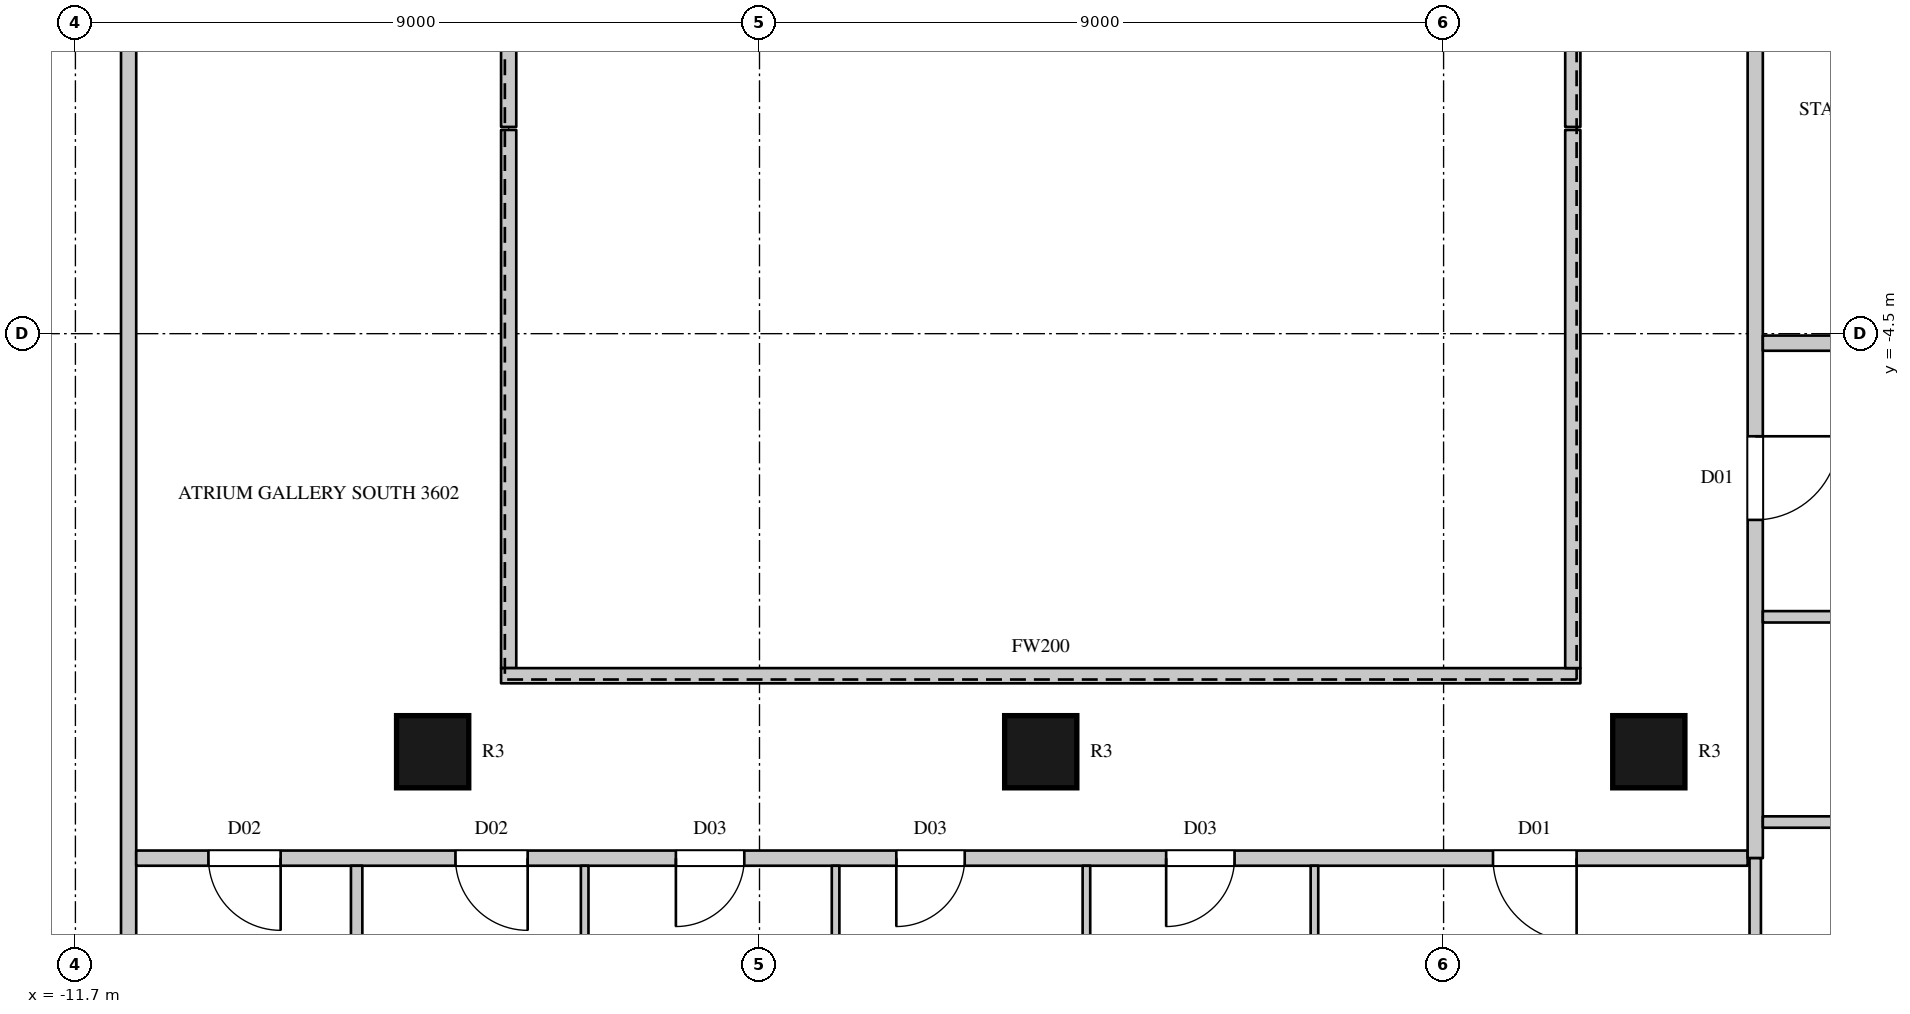
"""IFC4 building model, lengths in metres.
Left out: names, types, materials, properties, quantities, classifications, styles, units other than length and angle.
Written with IfcOpenShell. Run it as: python <this file> out.ifc"""

import sys

from ifc_helpers import new_model, si_unit, direction, frame, frame_2d, origin, origin_2d, place, context, subcontext, project, spatial, rectangle, circle, extrude, element, fill, save


model = new_model("IFC4")
c1 = context("Model", 3, precision=1e-05, world=origin(), true_north=direction((0.0, 1.0)))
c2 = subcontext(c1, "Body", "Model", "MODEL_VIEW")
j1 = project(units=[si_unit("LENGTHUNIT", "METRE"), si_unit("PLANEANGLEUNIT", "RADIAN")], contexts=[c1])
p1 = place(None, origin())
s1 = spatial("IfcSite", under=j1, at=p1, CompositionType="ELEMENT")
p2 = place(p1, origin())
s2 = spatial("IfcBuilding", under=s1, at=p2, CompositionType="ELEMENT")
p3 = place(p2, frame((0.0, 0.0, 168.7)))
s3 = spatial("IfcBuildingStorey", under=s2, at=p3, CompositionType="ELEMENT", Elevation=168.7)
for number, where, z_axis, x_axis in (
    (1, (-7.0, -10.0, 0.0), (0.0, 0.0, 1.0), (1.0, 0.0, 0.0)),
    (2, (1.0, -10.0, 0.0), (0.0, 0.0, 1.0), (1.0, 0.0, 0.0)),
    (3, (9.0, -10.0, 0.0), (0.0, 0.0, 1.0), (1.0, 0.0, 0.0)),
):
    element("IfcColumn", number, at=place(p3, frame(where, z_axis=z_axis, x_axis=x_axis)), inside=s3, PredefinedType="COLUMN", context=c2, shape_type="SweptSolid", body=[
        extrude(circle(Radius=0.475, at=origin_2d()), origin(), (0.0, 0.0, 1.0), 4.1),
    ])
p4 = place(p3, frame((-11.0, -14.8, 0.0), z_axis=(0.0, 0.0, 1.0), x_axis=(0.0, 1.0, 0.0)))
e4 = element("IfcWall", 4, at=p4, inside=s3, PredefinedType="PARTITIONING", context=c2, shape_type="SweptSolid", body=[
    extrude(rectangle(XDim=29.6, YDim=0.2, at=frame_2d((14.8, 0.0))), origin(), (0.0, 0.0, 1.0), 3.8),
])
p5 = place(p4, frame((19.25, 0.0, 0.0)))
e5 = element("IfcOpeningElement", 5, at=p5, cuts=e4, PredefinedType="OPENING", context=c2, shape_type="SweptSolid", body=[
    extrude(rectangle(XDim=1.5, YDim=2.4, at=frame_2d((0.75, 1.2))), frame((0.0, 0.11, 0.0), z_axis=(0.0, -1.0, 0.0), x_axis=(1.0, 0.0, 0.0)), (0.0, 0.0, 1.0), 0.22),
])
p6 = place(p3, frame((-10.9, -11.4, 0.0), z_axis=(0.0, 0.0, 1.0), x_axis=(1.0, 0.0, 0.0)))
e6 = element("IfcWall", 6, at=p6, inside=s3, PredefinedType="PARTITIONING", context=c2, shape_type="SweptSolid", body=[
    extrude(rectangle(XDim=21.2, YDim=0.2, at=frame_2d((10.6, 0.0))), origin(), (0.0, 0.0, 1.0), 3.8),
])
p7 = place(p6, frame((0.95, 0.0, 0.0)))
e7 = element("IfcOpeningElement", 7, at=p7, cuts=e6, PredefinedType="OPENING", context=c2, shape_type="SweptSolid", body=[
    extrude(rectangle(XDim=0.95, YDim=2.2, at=frame_2d((0.475, 1.1))), frame((0.0, 0.11, 0.0), z_axis=(0.0, -1.0, 0.0), x_axis=(1.0, 0.0, 0.0)), (0.0, 0.0, 1.0), 0.22),
])
p8 = place(p6, frame((4.2, 0.0, 0.0)))
e8 = element("IfcOpeningElement", 8, at=p8, cuts=e6, PredefinedType="OPENING", context=c2, shape_type="SweptSolid", body=[
    extrude(rectangle(XDim=0.95, YDim=2.2, at=frame_2d((0.475, 1.1))), frame((0.0, 0.11, 0.0), z_axis=(0.0, -1.0, 0.0), x_axis=(1.0, 0.0, 0.0)), (0.0, 0.0, 1.0), 0.22),
])
p9 = place(p6, frame((7.1, 0.0, 0.0)))
e9 = element("IfcOpeningElement", 9, at=p9, cuts=e6, PredefinedType="OPENING", context=c2, shape_type="SweptSolid", body=[
    extrude(rectangle(XDim=0.9, YDim=2.2, at=frame_2d((0.45, 1.1))), frame((0.0, 0.11, 0.0), z_axis=(0.0, -1.0, 0.0), x_axis=(1.0, 0.0, 0.0)), (0.0, 0.0, 1.0), 0.22),
])
p10 = place(p6, frame((10.0, 0.0, 0.0)))
e10 = element("IfcOpeningElement", 10, at=p10, cuts=e6, PredefinedType="OPENING", context=c2, shape_type="SweptSolid", body=[
    extrude(rectangle(XDim=0.9, YDim=2.2, at=frame_2d((0.45, 1.1))), frame((0.0, 0.11, 0.0), z_axis=(0.0, -1.0, 0.0), x_axis=(1.0, 0.0, 0.0)), (0.0, 0.0, 1.0), 0.22),
])
p11 = place(p6, frame((13.55, 0.0, 0.0)))
e11 = element("IfcOpeningElement", 11, at=p11, cuts=e6, PredefinedType="OPENING", context=c2, shape_type="SweptSolid", body=[
    extrude(rectangle(XDim=0.9, YDim=2.2, at=frame_2d((0.45, 1.1))), frame((0.0, 0.11, 0.0), z_axis=(0.0, -1.0, 0.0), x_axis=(1.0, 0.0, 0.0)), (0.0, 0.0, 1.0), 0.22),
])
p12 = place(p6, frame((17.85, 0.0, 0.0)))
e12 = element("IfcOpeningElement", 12, at=p12, cuts=e6, PredefinedType="OPENING", context=c2, shape_type="SweptSolid", body=[
    extrude(rectangle(XDim=1.1, YDim=2.4, at=frame_2d((0.55, 1.2))), frame((0.0, 0.11, 0.0), z_axis=(0.0, -1.0, 0.0), x_axis=(1.0, 0.0, 0.0)), (0.0, 0.0, 1.0), 0.22),
])
p13 = place(p3, frame((-6.0, -8.9, 0.0), z_axis=(0.0, 0.0, 1.0), x_axis=(0.0, 1.0, 0.0)))
e13 = element("IfcWall", 13, at=p13, inside=s3, PredefinedType="PARTITIONING", context=c2, shape_type="SweptSolid", body=[
    extrude(rectangle(XDim=7.08, YDim=0.2, at=frame_2d((3.54, 0.0))), origin(), (0.0, 0.0, 1.0), 3.8),
])
p14 = place(p3, frame((-6.1, -9.0, 0.0), z_axis=(0.0, 0.0, 1.0), x_axis=(1.0, 0.0, 0.0)))
e14 = element("IfcWall", 14, at=p14, inside=s3, PredefinedType="PARTITIONING", context=c2, shape_type="SweptSolid", body=[
    extrude(rectangle(XDim=14.2, YDim=0.2, at=frame_2d((7.1, 0.0))), origin(), (0.0, 0.0, 1.0), 3.8),
])
p15 = place(p3, frame((-6.0, -1.78, 0.0), z_axis=(0.0, 0.0, 1.0), x_axis=(0.0, 1.0, 0.0)))
e15 = element("IfcWall", 15, at=p15, inside=s3, PredefinedType="PARTITIONING", context=c2, shape_type="SweptSolid", body=[
    extrude(rectangle(XDim=10.68, YDim=0.2, at=frame_2d((5.34, 0.0))), origin(), (0.0, 0.0, 1.0), 3.8),
])
p16 = place(p3, frame((8.0, -8.9, 0.0), z_axis=(0.0, 0.0, 1.0), x_axis=(0.0, 1.0, 0.0)))
e16 = element("IfcWall", 16, at=p16, inside=s3, PredefinedType="PARTITIONING", context=c2, shape_type="SweptSolid", body=[
    extrude(rectangle(XDim=7.08, YDim=0.2, at=frame_2d((3.54, 0.0))), origin(), (0.0, 0.0, 1.0), 3.8),
])
p17 = place(p3, frame((8.0, -1.78, 0.0), z_axis=(0.0, 0.0, 1.0), x_axis=(0.0, 1.0, 0.0)))
e17 = element("IfcWall", 17, at=p17, inside=s3, PredefinedType="PARTITIONING", context=c2, shape_type="SweptSolid", body=[
    extrude(rectangle(XDim=10.68, YDim=0.2, at=frame_2d((5.34, 0.0))), origin(), (0.0, 0.0, 1.0), 3.8),
])
p18 = place(p3, frame((10.4, -11.4, 0.0), z_axis=(0.0, 0.0, 1.0), x_axis=(0.0, 1.0, 0.0)))
e18 = element("IfcWall", 18, at=p18, inside=s3, PredefinedType="PARTITIONING", context=c2, shape_type="SweptSolid", body=[
    extrude(rectangle(XDim=23.5, YDim=0.2, at=frame_2d((11.75, 0.0))), origin(), (0.0, 0.0, 1.0), 3.8),
])
p19 = place(p18, frame((12.1, 0.0, 0.0)))
e19 = element("IfcOpeningElement", 19, at=p19, cuts=e18, PredefinedType="OPENING", context=c2, shape_type="SweptSolid", body=[
    extrude(rectangle(XDim=1.5, YDim=2.4, at=frame_2d((0.75, 1.2))), frame((0.0, 0.11, 0.0), z_axis=(0.0, -1.0, 0.0), x_axis=(1.0, 0.0, 0.0)), (0.0, 0.0, 1.0), 0.22),
])
p20 = place(p18, frame((19.25, 0.0, 0.0)))
e20 = element("IfcOpeningElement", 20, at=p20, cuts=e18, PredefinedType="OPENING", context=c2, shape_type="SweptSolid", body=[
    extrude(rectangle(XDim=1.1, YDim=2.4, at=frame_2d((0.55, 1.2))), frame((0.0, 0.11, 0.0), z_axis=(0.0, -1.0, 0.0), x_axis=(1.0, 0.0, 0.0)), (0.0, 0.0, 1.0), 0.22),
])
p21 = place(p18, frame((4.45, 0.0, 0.0)))
e21 = element("IfcOpeningElement", 21, at=p21, cuts=e18, PredefinedType="OPENING", context=c2, shape_type="SweptSolid", body=[
    extrude(rectangle(XDim=1.1, YDim=2.4, at=frame_2d((0.55, 1.2))), frame((0.0, 0.11, 0.0), z_axis=(0.0, -1.0, 0.0), x_axis=(1.0, 0.0, 0.0)), (0.0, 0.0, 1.0), 0.22),
])
p22 = place(p3, frame((10.5, -4.625, 0.0), z_axis=(0.0, 0.0, 1.0), x_axis=(1.0, 0.0, 0.0)))
e22 = element("IfcWall", 22, at=p22, inside=s3, PredefinedType="PARTITIONING", context=c2, shape_type="SweptSolid", body=[
    extrude(rectangle(XDim=4.175, YDim=0.2, at=frame_2d((2.087, 0.0))), origin(), (0.0, 0.0, 1.0), 3.8),
])
p23 = place(p3, frame((-8.0, -16.7, 0.0), z_axis=(0.0, 0.0, 1.0), x_axis=(0.0, 1.0, 0.0)))
e23 = element("IfcWall", 23, at=p23, inside=s3, PredefinedType="PARTITIONING", context=c2, shape_type="SweptSolid", body=[
    extrude(rectangle(XDim=5.2, YDim=0.15, at=frame_2d((2.6, 0.0))), origin(), (0.0, 0.0, 1.0), 3.8),
])
p24 = place(p3, frame((10.4, -16.7, 0.0), z_axis=(0.0, 0.0, 1.0), x_axis=(0.0, 1.0, 0.0)))
e24 = element("IfcWall", 24, at=p24, inside=s3, PredefinedType="PARTITIONING", context=c2, shape_type="SweptSolid", body=[
    extrude(rectangle(XDim=5.3, YDim=0.15, at=frame_2d((2.65, 0.0))), origin(), (0.0, 0.0, 1.0), 3.8),
])
p25 = place(p3, frame((10.5, -10.925, 0.0), z_axis=(0.0, 0.0, 1.0), x_axis=(1.0, 0.0, 0.0)))
e25 = element("IfcWall", 25, at=p25, inside=s3, PredefinedType="PARTITIONING", context=c2, shape_type="SweptSolid", body=[
    extrude(rectangle(XDim=2.606, YDim=0.15, at=frame_2d((1.303, 0.0))), origin(), (0.0, 0.0, 1.0), 3.8),
])
p26 = place(p25, frame((1.2, 0.0, 0.0)))
e26 = element("IfcOpeningElement", 26, at=p26, cuts=e25, PredefinedType="OPENING", context=c2, shape_type="SweptSolid", body=[
    extrude(rectangle(XDim=0.95, YDim=2.2, at=frame_2d((0.475, 1.1))), frame((0.0, 0.085, 0.0), z_axis=(0.0, -1.0, 0.0), x_axis=(1.0, 0.0, 0.0)), (0.0, 0.0, 1.0), 0.17),
])
p27 = place(p3, frame((10.5, -8.225, 0.0), z_axis=(0.0, 0.0, 1.0), x_axis=(1.0, 0.0, 0.0)))
e27 = element("IfcWall", 27, at=p27, inside=s3, PredefinedType="PARTITIONING", context=c2, shape_type="SweptSolid", body=[
    extrude(rectangle(XDim=3.575, YDim=0.15, at=frame_2d((1.788, 0.0))), origin(), (0.0, 0.0, 1.0), 3.15),
])
for number, where, z_axis, x_axis in (
    (28, (-5.0, -16.7, 0.0), (0.0, 0.0, 1.0), (0.0, 1.0, 0.0)),
    (29, (-1.699, -16.7, 0.0), (0.0, 0.0, 1.0), (0.0, 1.0, 0.0)),
):
    element("IfcWall", number, at=place(p3, frame(where, z_axis=z_axis, x_axis=x_axis)), inside=s3, PredefinedType="PARTITIONING", context=c2, shape_type="SweptSolid", body=[
        extrude(rectangle(XDim=5.2, YDim=0.1, at=frame_2d((2.6, 0.0))), origin(), (0.0, 0.0, 1.0), 3.8),
    ])
p28 = place(p3, frame((1.601, -16.7, 0.0), z_axis=(0.0, 0.0, 1.0), x_axis=(0.0, 1.0, 0.0)))
e30 = element("IfcWall", 30, at=p28, inside=s3, PredefinedType="PARTITIONING", context=c2, shape_type="SweptSolid", body=[
    extrude(rectangle(XDim=5.2, YDim=0.1, at=frame_2d((2.6, 0.0))), origin(), (0.0, 0.0, 1.0), 3.15),
])
p29 = place(p3, frame((4.601, -16.7, 0.0), z_axis=(0.0, 0.0, 1.0), x_axis=(0.0, 1.0, 0.0)))
e31 = element("IfcWall", 31, at=p29, inside=s3, PredefinedType="PARTITIONING", context=c2, shape_type="SweptSolid", body=[
    extrude(rectangle(XDim=5.2, YDim=0.1, at=frame_2d((2.6, 0.0))), origin(), (0.0, 0.0, 1.0), 3.8),
])
p30 = place(p7, origin())
e32 = element("IfcDoor", 32, at=p30, inside=s3, OperationType="SINGLE_SWING_LEFT", PredefinedType="DOOR", context=c2, shape_type="SweptSolid", body=[
    extrude(rectangle(XDim=0.95, YDim=2.2, at=frame_2d((0.475, 1.1))), frame((0.0, 0.025, 0.0), z_axis=(0.0, -1.0, 0.0), x_axis=(1.0, 0.0, 0.0)), (0.0, 0.0, 1.0), 0.05),
])
fill(e7, e32)
p31 = place(p8, origin())
e33 = element("IfcDoor", 33, at=p31, inside=s3, OperationType="SINGLE_SWING_LEFT", PredefinedType="DOOR", context=c2, shape_type="SweptSolid", body=[
    extrude(rectangle(XDim=0.95, YDim=2.2, at=frame_2d((0.475, 1.1))), frame((0.0, 0.025, 0.0), z_axis=(0.0, -1.0, 0.0), x_axis=(1.0, 0.0, 0.0)), (0.0, 0.0, 1.0), 0.05),
])
fill(e8, e33)
p32 = place(p9, origin())
e34 = element("IfcDoor", 34, at=p32, inside=s3, OperationType="SINGLE_SWING_RIGHT", PredefinedType="DOOR", context=c2, shape_type="SweptSolid", body=[
    extrude(rectangle(XDim=0.9, YDim=2.2, at=frame_2d((0.45, 1.1))), frame((0.0, 0.025, 0.0), z_axis=(0.0, -1.0, 0.0), x_axis=(1.0, 0.0, 0.0)), (0.0, 0.0, 1.0), 0.05),
])
fill(e9, e34)
p33 = place(p10, origin())
e35 = element("IfcDoor", 35, at=p33, inside=s3, OperationType="SINGLE_SWING_RIGHT", PredefinedType="DOOR", context=c2, shape_type="SweptSolid", body=[
    extrude(rectangle(XDim=0.9, YDim=2.2, at=frame_2d((0.45, 1.1))), frame((0.0, 0.025, 0.0), z_axis=(0.0, -1.0, 0.0), x_axis=(1.0, 0.0, 0.0)), (0.0, 0.0, 1.0), 0.05),
])
fill(e10, e35)
p34 = place(p11, origin())
e36 = element("IfcDoor", 36, at=p34, inside=s3, OperationType="SINGLE_SWING_RIGHT", PredefinedType="DOOR", context=c2, shape_type="SweptSolid", body=[
    extrude(rectangle(XDim=0.9, YDim=2.2, at=frame_2d((0.45, 1.1))), frame((0.0, 0.025, 0.0), z_axis=(0.0, -1.0, 0.0), x_axis=(1.0, 0.0, 0.0)), (0.0, 0.0, 1.0), 0.05),
])
fill(e11, e36)
p35 = place(p12, origin())
e37 = element("IfcDoor", 37, at=p35, inside=s3, OperationType="SINGLE_SWING_LEFT", PredefinedType="DOOR", context=c2, shape_type="SweptSolid", body=[
    extrude(rectangle(XDim=1.1, YDim=2.4, at=frame_2d((0.55, 1.2))), frame((0.0, 0.025, 0.0), z_axis=(0.0, -1.0, 0.0), x_axis=(1.0, 0.0, 0.0)), (0.0, 0.0, 1.0), 0.05),
])
fill(e12, e37)
p36 = place(p21, origin())
e38 = element("IfcDoor", 38, at=p36, inside=s3, OperationType="SINGLE_SWING_LEFT", PredefinedType="DOOR", context=c2, shape_type="SweptSolid", body=[
    extrude(rectangle(XDim=1.1, YDim=2.4, at=frame_2d((0.55, 1.2))), frame((0.0, 0.025, 0.0), z_axis=(0.0, -1.0, 0.0), x_axis=(1.0, 0.0, 0.0)), (0.0, 0.0, 1.0), 0.05),
])
fill(e21, e38)
save(model, sys.argv[1])
